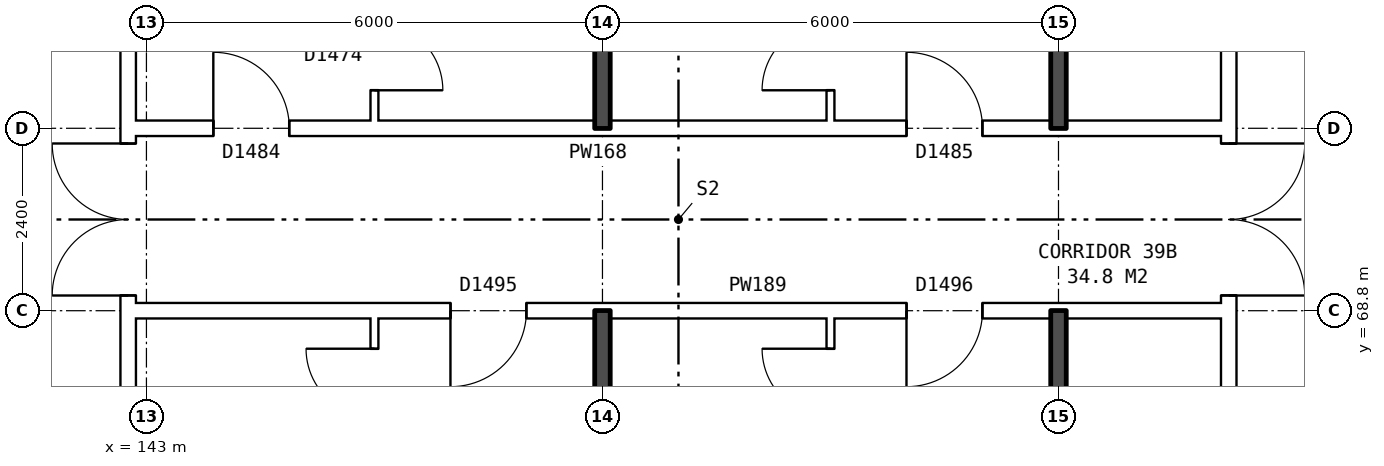
"""IFC4 building model, lengths in metres.
Left out: names, types, materials, properties, quantities, classifications, styles, units other than length and angle.
Written with IfcOpenShell. Run it as: python <this file> out.ifc"""

import sys

from ifc_helpers import new_model, si_unit, direction, frame, frame_2d, origin, place, context, subcontext, project, spatial, rectangle, extrude, element, fill, save


model = new_model("IFC4")
c1 = context("Model", 3, precision=1e-05, world=origin(), true_north=direction((0.0, 1.0)))
c2 = subcontext(c1, "Body", "Model", "MODEL_VIEW")
j1 = project(units=[si_unit("LENGTHUNIT", "METRE"), si_unit("PLANEANGLEUNIT", "RADIAN")], contexts=[c1])
p1 = place(None, origin())
s1 = spatial("IfcSite", under=j1, at=p1, CompositionType="ELEMENT")
p2 = place(p1, origin())
s2 = spatial("IfcBuilding", under=s1, at=p2, CompositionType="ELEMENT")
p3 = place(p2, frame((0.0, 0.0, 139.2)))
s3 = spatial("IfcBuildingStorey", under=s2, at=p3, CompositionType="ELEMENT", Elevation=139.2)
p4 = place(p3, frame((142.76, 63.9, 0.0), z_axis=(0.0, 0.0, 1.0), x_axis=(0.0, 1.0, 0.0)))
e1 = element("IfcWall", 1, at=p4, inside=s3, PredefinedType="PARTITIONING", context=c2, shape_type="SweptSolid", body=[
    extrude(rectangle(XDim=12.2, YDim=0.2, at=frame_2d((6.1, 0.0))), origin(), (0.0, 0.0, 1.0), 2.85),
])
p5 = place(p4, frame((5.1, 0.0, 0.0)))
e2 = element("IfcOpeningElement", 2, at=p5, cuts=e1, PredefinedType="OPENING", context=c2, shape_type="SweptSolid", body=[
    extrude(rectangle(XDim=2.0, YDim=2.1, at=frame_2d((1.0, 1.05))), frame((0.0, 0.11, 0.0), z_axis=(0.0, -1.0, 0.0), x_axis=(1.0, 0.0, 0.0)), (0.0, 0.0, 1.0), 0.22),
])
p6 = place(p3, frame((157.24, 63.9, 0.0), z_axis=(0.0, 0.0, 1.0), x_axis=(0.0, 1.0, 0.0)))
e3 = element("IfcWall", 3, at=p6, inside=s3, PredefinedType="PARTITIONING", context=c2, shape_type="SweptSolid", body=[
    extrude(rectangle(XDim=12.2, YDim=0.2, at=frame_2d((6.1, 0.0))), origin(), (0.0, 0.0, 1.0), 2.85),
])
p7 = place(p6, frame((5.1, 0.0, 0.0)))
e4 = element("IfcOpeningElement", 4, at=p7, cuts=e3, PredefinedType="OPENING", context=c2, shape_type="SweptSolid", body=[
    extrude(rectangle(XDim=2.0, YDim=2.1, at=frame_2d((1.0, 1.05))), frame((0.0, 0.11, 0.0), z_axis=(0.0, -1.0, 0.0), x_axis=(1.0, 0.0, 0.0)), (0.0, 0.0, 1.0), 0.22),
])
p8 = place(p3, frame((142.76, 68.8, 0.0), z_axis=(0.0, 0.0, 1.0), x_axis=(1.0, 0.0, 0.0)))
e5 = element("IfcWall", 5, at=p8, inside=s3, PredefinedType="PARTITIONING", context=c2, shape_type="SweptSolid", body=[
    extrude(rectangle(XDim=14.48, YDim=0.2, at=frame_2d((7.24, 0.0))), origin(), (0.0, 0.0, 1.0), 2.85),
])
p9 = place(p8, frame((4.24, 0.0, 0.0)))
e6 = element("IfcOpeningElement", 6, at=p9, cuts=e5, PredefinedType="OPENING", context=c2, shape_type="SweptSolid", body=[
    extrude(rectangle(XDim=1.0, YDim=2.1, at=frame_2d((0.5, 1.05))), frame((0.0, 0.11, 0.0), z_axis=(0.0, -1.0, 0.0), x_axis=(1.0, 0.0, 0.0)), (0.0, 0.0, 1.0), 0.22),
])
p10 = place(p8, frame((10.24, 0.0, 0.0)))
e7 = element("IfcOpeningElement", 7, at=p10, cuts=e5, PredefinedType="OPENING", context=c2, shape_type="SweptSolid", body=[
    extrude(rectangle(XDim=1.0, YDim=2.1, at=frame_2d((0.5, 1.05))), frame((0.0, 0.11, 0.0), z_axis=(0.0, -1.0, 0.0), x_axis=(1.0, 0.0, 0.0)), (0.0, 0.0, 1.0), 0.22),
])
p11 = place(p3, frame((142.76, 71.2, 0.0), z_axis=(0.0, 0.0, 1.0), x_axis=(1.0, 0.0, 0.0)))
e8 = element("IfcWall", 8, at=p11, inside=s3, PredefinedType="PARTITIONING", context=c2, shape_type="SweptSolid", body=[
    extrude(rectangle(XDim=14.48, YDim=0.2, at=frame_2d((7.24, 0.0))), origin(), (0.0, 0.0, 1.0), 2.85),
])
p12 = place(p11, frame((1.12, 0.0, 0.0)))
e9 = element("IfcOpeningElement", 9, at=p12, cuts=e8, PredefinedType="OPENING", context=c2, shape_type="SweptSolid", body=[
    extrude(rectangle(XDim=1.0, YDim=2.1, at=frame_2d((0.5, 1.05))), frame((0.0, 0.11, 0.0), z_axis=(0.0, -1.0, 0.0), x_axis=(1.0, 0.0, 0.0)), (0.0, 0.0, 1.0), 0.22),
])
p13 = place(p11, frame((10.24, 0.0, 0.0)))
e10 = element("IfcOpeningElement", 10, at=p13, cuts=e8, PredefinedType="OPENING", context=c2, shape_type="SweptSolid", body=[
    extrude(rectangle(XDim=1.0, YDim=2.1, at=frame_2d((0.5, 1.05))), frame((0.0, 0.11, 0.0), z_axis=(0.0, -1.0, 0.0), x_axis=(1.0, 0.0, 0.0)), (0.0, 0.0, 1.0), 0.22),
])
p14 = place(p3, frame((146.0, 54.36, 0.0), z_axis=(0.0, 0.0, 1.0), x_axis=(0.0, 1.0, 0.0)))
e11 = element("IfcWall", 11, at=p14, inside=s3, PredefinedType="PARTITIONING", context=c2, shape_type="SweptSolid", body=[
    extrude(rectangle(XDim=14.34, YDim=0.1, at=frame_2d((7.17, 0.0))), origin(), (0.0, 0.0, 1.0), 2.85),
])
p15 = place(p14, frame((6.7, 0.0, 0.0)))
e12 = element("IfcOpeningElement", 12, at=p15, cuts=e11, PredefinedType="OPENING", context=c2, shape_type="SweptSolid", body=[
    extrude(rectangle(XDim=0.9, YDim=2.1, at=frame_2d((0.45, 1.05))), frame((0.0, 0.06, 0.0), z_axis=(0.0, -1.0, 0.0), x_axis=(1.0, 0.0, 0.0)), (0.0, 0.0, 1.0), 0.12),
])
p16 = place(p14, frame((13.04, 0.0, 0.0)))
e13 = element("IfcOpeningElement", 13, at=p16, cuts=e11, PredefinedType="OPENING", context=c2, shape_type="SweptSolid", body=[
    extrude(rectangle(XDim=0.9, YDim=2.1, at=frame_2d((0.45, 1.05))), frame((0.0, 0.06, 0.0), z_axis=(0.0, -1.0, 0.0), x_axis=(1.0, 0.0, 0.0)), (0.0, 0.0, 1.0), 0.12),
])
p17 = place(p3, frame((146.0, 71.3, 0.0), z_axis=(0.0, 0.0, 1.0), x_axis=(0.0, 1.0, 0.0)))
e14 = element("IfcWall", 14, at=p17, inside=s3, PredefinedType="PARTITIONING", context=c2, shape_type="SweptSolid", body=[
    extrude(rectangle(XDim=14.34, YDim=0.1, at=frame_2d((7.17, 0.0))), origin(), (0.0, 0.0, 1.0), 2.85),
])
p18 = place(p17, frame((6.74, 0.0, 0.0)))
e15 = element("IfcOpeningElement", 15, at=p18, cuts=e14, PredefinedType="OPENING", context=c2, shape_type="SweptSolid", body=[
    extrude(rectangle(XDim=0.9, YDim=2.1, at=frame_2d((0.45, 1.05))), frame((0.0, 0.06, 0.0), z_axis=(0.0, -1.0, 0.0), x_axis=(1.0, 0.0, 0.0)), (0.0, 0.0, 1.0), 0.12),
])
p19 = place(p17, frame((0.4, 0.0, 0.0)))
e16 = element("IfcOpeningElement", 16, at=p19, cuts=e14, PredefinedType="OPENING", context=c2, shape_type="SweptSolid", body=[
    extrude(rectangle(XDim=0.9, YDim=2.1, at=frame_2d((0.45, 1.05))), frame((0.0, 0.06, 0.0), z_axis=(0.0, -1.0, 0.0), x_axis=(1.0, 0.0, 0.0)), (0.0, 0.0, 1.0), 0.12),
])
for number, where, z_axis, x_axis in (
    (17, (149.0, 54.36, 0.0), (0.0, 0.0, 1.0), (0.0, 1.0, 0.0)),
    (18, (149.0, 71.2, 0.0), (0.0, 0.0, 1.0), (0.0, 1.0, 0.0)),
):
    element("IfcWall", number, at=place(p3, frame(where, z_axis=z_axis, x_axis=x_axis)), inside=s3, PredefinedType="SOLIDWALL", context=c2, shape_type="SweptSolid", body=[
        extrude(rectangle(XDim=14.44, YDim=0.2, at=frame_2d((7.22, 0.0))), origin(), (0.0, 0.0, 1.0), 2.85),
    ])
p20 = place(p3, frame((152.0, 54.36, 0.0), z_axis=(0.0, 0.0, 1.0), x_axis=(0.0, 1.0, 0.0)))
e19 = element("IfcWall", 19, at=p20, inside=s3, PredefinedType="PARTITIONING", context=c2, shape_type="SweptSolid", body=[
    extrude(rectangle(XDim=14.34, YDim=0.1, at=frame_2d((7.17, 0.0))), origin(), (0.0, 0.0, 1.0), 2.85),
])
p21 = place(p20, frame((4.2, 0.0, 0.0)))
e20 = element("IfcOpeningElement", 20, at=p21, cuts=e19, PredefinedType="OPENING", context=c2, shape_type="SweptSolid", body=[
    extrude(rectangle(XDim=0.9, YDim=2.1, at=frame_2d((0.45, 1.05))), frame((0.0, 0.06, 0.0), z_axis=(0.0, -1.0, 0.0), x_axis=(1.0, 0.0, 0.0)), (0.0, 0.0, 1.0), 0.12),
])
p22 = place(p20, frame((13.04, 0.0, 0.0)))
e21 = element("IfcOpeningElement", 21, at=p22, cuts=e19, PredefinedType="OPENING", context=c2, shape_type="SweptSolid", body=[
    extrude(rectangle(XDim=0.9, YDim=2.1, at=frame_2d((0.45, 1.05))), frame((0.0, 0.06, 0.0), z_axis=(0.0, -1.0, 0.0), x_axis=(1.0, 0.0, 0.0)), (0.0, 0.0, 1.0), 0.12),
])
p23 = place(p3, frame((152.0, 71.3, 0.0), z_axis=(0.0, 0.0, 1.0), x_axis=(0.0, 1.0, 0.0)))
e22 = element("IfcWall", 22, at=p23, inside=s3, PredefinedType="PARTITIONING", context=c2, shape_type="SweptSolid", body=[
    extrude(rectangle(XDim=14.34, YDim=0.1, at=frame_2d((7.17, 0.0))), origin(), (0.0, 0.0, 1.0), 2.85),
])
p24 = place(p23, frame((7.94, 0.0, 0.0)))
e23 = element("IfcOpeningElement", 23, at=p24, cuts=e22, PredefinedType="OPENING", context=c2, shape_type="SweptSolid", body=[
    extrude(rectangle(XDim=0.9, YDim=2.1, at=frame_2d((0.45, 1.05))), frame((0.0, 0.06, 0.0), z_axis=(0.0, -1.0, 0.0), x_axis=(1.0, 0.0, 0.0)), (0.0, 0.0, 1.0), 0.12),
])
p25 = place(p23, frame((0.4, 0.0, 0.0)))
e24 = element("IfcOpeningElement", 24, at=p25, cuts=e22, PredefinedType="OPENING", context=c2, shape_type="SweptSolid", body=[
    extrude(rectangle(XDim=0.9, YDim=2.1, at=frame_2d((0.45, 1.05))), frame((0.0, 0.06, 0.0), z_axis=(0.0, -1.0, 0.0), x_axis=(1.0, 0.0, 0.0)), (0.0, 0.0, 1.0), 0.12),
])
for number, where, z_axis, x_axis in (
    (25, (155.0, 63.8, 0.0), (0.0, 0.0, 1.0), (0.0, 1.0, 0.0)),
    (26, (155.0, 71.2, 0.0), (0.0, 0.0, 1.0), (0.0, 1.0, 0.0)),
):
    element("IfcWall", number, at=place(p3, frame(where, z_axis=z_axis, x_axis=x_axis)), inside=s3, PredefinedType="SOLIDWALL", context=c2, shape_type="SweptSolid", body=[
        extrude(rectangle(XDim=5.0, YDim=0.2, at=frame_2d((2.5, 0.0))), origin(), (0.0, 0.0, 1.0), 2.85),
    ])
p26 = place(p5, origin())
e27 = element("IfcDoor", 27, at=p26, inside=s3, OperationType="DOUBLE_DOOR_SINGLE_SWING", PredefinedType="DOOR", context=c2, shape_type="SweptSolid", body=[
    extrude(rectangle(XDim=2.0, YDim=2.1, at=frame_2d((1.0, 1.05))), frame((0.0, 0.025, 0.0), z_axis=(0.0, -1.0, 0.0), x_axis=(1.0, 0.0, 0.0)), (0.0, 0.0, 1.0), 0.05),
])
fill(e2, e27)
p27 = place(p7, frame((2.0, 0.0, 0.0), z_axis=(0.0, 0.0, 1.0), x_axis=(-1.0, 0.0, 0.0)))
e28 = element("IfcDoor", 28, at=p27, inside=s3, OperationType="DOUBLE_DOOR_SINGLE_SWING", PredefinedType="DOOR", context=c2, shape_type="SweptSolid", body=[
    extrude(rectangle(XDim=2.0, YDim=2.1, at=frame_2d((1.0, 1.05))), frame((0.0, 0.025, 0.0), z_axis=(0.0, -1.0, 0.0), x_axis=(1.0, 0.0, 0.0)), (0.0, 0.0, 1.0), 0.05),
])
fill(e4, e28)
p28 = place(p9, frame((1.0, 0.0, 0.0), z_axis=(0.0, 0.0, 1.0), x_axis=(-1.0, 0.0, 0.0)))
e29 = element("IfcDoor", 29, at=p28, inside=s3, OperationType="SINGLE_SWING_RIGHT", PredefinedType="DOOR", context=c2, shape_type="SweptSolid", body=[
    extrude(rectangle(XDim=1.0, YDim=2.1, at=frame_2d((0.5, 1.05))), frame((0.0, 0.025, 0.0), z_axis=(0.0, -1.0, 0.0), x_axis=(1.0, 0.0, 0.0)), (0.0, 0.0, 1.0), 0.05),
])
fill(e6, e29)
p29 = place(p16, origin())
e30 = element("IfcDoor", 30, at=p29, inside=s3, OperationType="SINGLE_SWING_RIGHT", PredefinedType="DOOR", context=c2, shape_type="SweptSolid", body=[
    extrude(rectangle(XDim=0.9, YDim=2.1, at=frame_2d((0.45, 1.05))), frame((0.0, 0.025, 0.0), z_axis=(0.0, -1.0, 0.0), x_axis=(1.0, 0.0, 0.0)), (0.0, 0.0, 1.0), 0.05),
])
fill(e13, e30)
p30 = place(p10, frame((1.0, 0.0, 0.0), z_axis=(0.0, 0.0, 1.0), x_axis=(-1.0, 0.0, 0.0)))
e31 = element("IfcDoor", 31, at=p30, inside=s3, OperationType="SINGLE_SWING_RIGHT", PredefinedType="DOOR", context=c2, shape_type="SweptSolid", body=[
    extrude(rectangle(XDim=1.0, YDim=2.1, at=frame_2d((0.5, 1.05))), frame((0.0, 0.025, 0.0), z_axis=(0.0, -1.0, 0.0), x_axis=(1.0, 0.0, 0.0)), (0.0, 0.0, 1.0), 0.05),
])
fill(e7, e31)
p31 = place(p22, origin())
e32 = element("IfcDoor", 32, at=p31, inside=s3, OperationType="SINGLE_SWING_RIGHT", PredefinedType="DOOR", context=c2, shape_type="SweptSolid", body=[
    extrude(rectangle(XDim=0.9, YDim=2.1, at=frame_2d((0.45, 1.05))), frame((0.0, 0.025, 0.0), z_axis=(0.0, -1.0, 0.0), x_axis=(1.0, 0.0, 0.0)), (0.0, 0.0, 1.0), 0.05),
])
fill(e21, e32)
p32 = place(p12, origin())
e33 = element("IfcDoor", 33, at=p32, inside=s3, OperationType="SINGLE_SWING_LEFT", PredefinedType="DOOR", context=c2, shape_type="SweptSolid", body=[
    extrude(rectangle(XDim=1.0, YDim=2.1, at=frame_2d((0.5, 1.05))), frame((0.0, 0.025, 0.0), z_axis=(0.0, -1.0, 0.0), x_axis=(1.0, 0.0, 0.0)), (0.0, 0.0, 1.0), 0.05),
])
fill(e9, e33)
p33 = place(p19, frame((0.9, 0.0, 0.0), z_axis=(0.0, 0.0, 1.0), x_axis=(-1.0, 0.0, 0.0)))
e34 = element("IfcDoor", 34, at=p33, inside=s3, OperationType="SINGLE_SWING_RIGHT", PredefinedType="DOOR", context=c2, shape_type="SweptSolid", body=[
    extrude(rectangle(XDim=0.9, YDim=2.1, at=frame_2d((0.45, 1.05))), frame((0.0, 0.025, 0.0), z_axis=(0.0, -1.0, 0.0), x_axis=(1.0, 0.0, 0.0)), (0.0, 0.0, 1.0), 0.05),
])
fill(e16, e34)
p34 = place(p13, origin())
e35 = element("IfcDoor", 35, at=p34, inside=s3, OperationType="SINGLE_SWING_LEFT", PredefinedType="DOOR", context=c2, shape_type="SweptSolid", body=[
    extrude(rectangle(XDim=1.0, YDim=2.1, at=frame_2d((0.5, 1.05))), frame((0.0, 0.025, 0.0), z_axis=(0.0, -1.0, 0.0), x_axis=(1.0, 0.0, 0.0)), (0.0, 0.0, 1.0), 0.05),
])
fill(e10, e35)
p35 = place(p25, origin())
e36 = element("IfcDoor", 36, at=p35, inside=s3, OperationType="SINGLE_SWING_LEFT", PredefinedType="DOOR", context=c2, shape_type="SweptSolid", body=[
    extrude(rectangle(XDim=0.9, YDim=2.1, at=frame_2d((0.45, 1.05))), frame((0.0, 0.025, 0.0), z_axis=(0.0, -1.0, 0.0), x_axis=(1.0, 0.0, 0.0)), (0.0, 0.0, 1.0), 0.05),
])
fill(e24, e36)
save(model, sys.argv[1])
